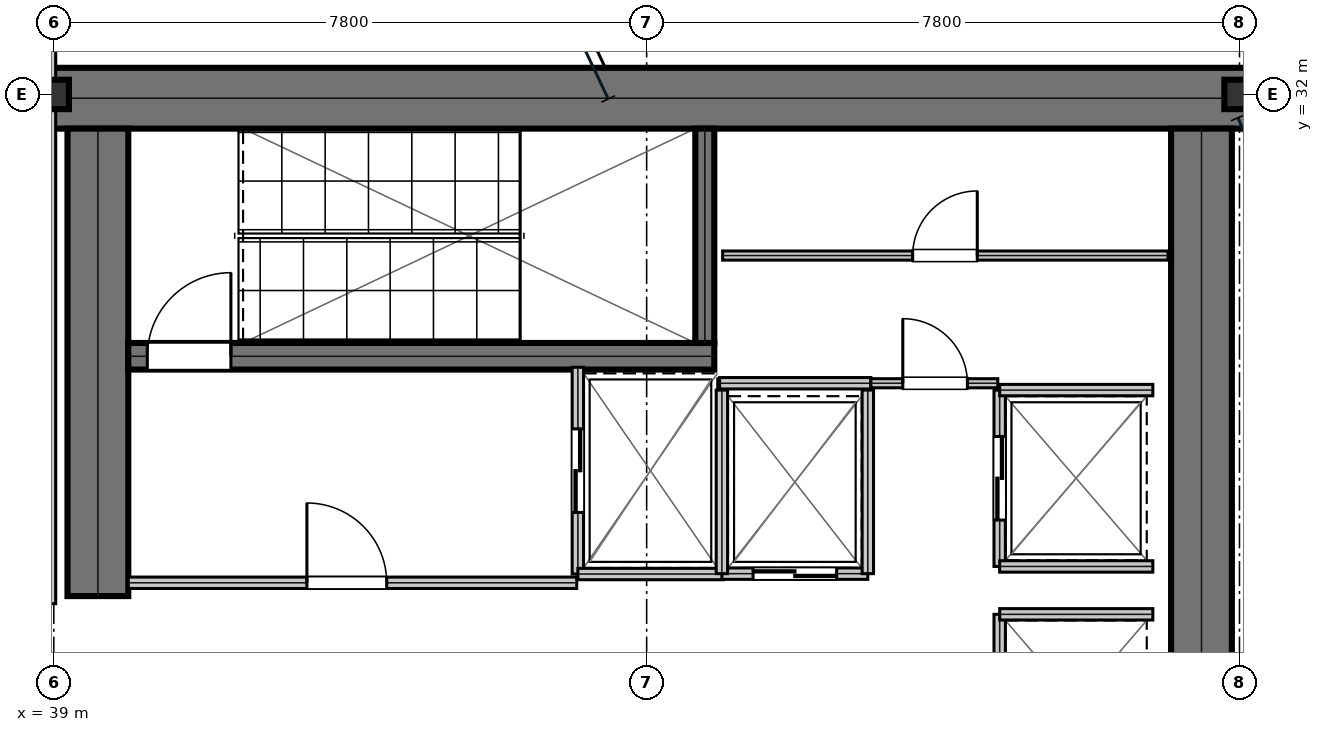
"""IFC4 building model, lengths in metres.
Left out: names, types, materials, properties, quantities, classifications, styles, units other than length and angle.
Written with IfcOpenShell. Run it as: python <this file> out.ifc"""

import sys

from ifc_helpers import new_model, si_unit, direction, frame, frame_2d, origin, origin_2d, place, context, subcontext, project, spatial, rectangle, i_section, extrude, element, fill, save


model = new_model("IFC4")
c1 = context("Model", 3, precision=1e-05, world=origin(), true_north=direction((0.0, 1.0)))
c2 = subcontext(c1, "Body", "Model", "MODEL_VIEW")
j1 = project(units=[si_unit("LENGTHUNIT", "METRE"), si_unit("PLANEANGLEUNIT", "RADIAN")], contexts=[c1])
p1 = place(None, origin())
s1 = spatial("IfcSite", under=j1, at=p1, CompositionType="ELEMENT")
p2 = place(p1, origin())
s2 = spatial("IfcBuilding", under=s1, at=p2, CompositionType="ELEMENT")
p3 = place(p2, frame((0.0, 0.0, 112.05)))
s3 = spatial("IfcBuildingStorey", under=s2, at=p3, CompositionType="ELEMENT", Elevation=112.05)
p4 = place(p3, frame((38.8, 31.95, 0.0), z_axis=(0.0, 0.0, 1.0), x_axis=(1.0, 0.0, 0.0)))
e1 = element("IfcWall", 1, at=p4, inside=s3, PredefinedType="SHEAR", context=c2, shape_type="SweptSolid", body=[
    extrude(rectangle(XDim=16.0, YDim=0.8, at=frame_2d((8.0, 0.0))), origin(), (0.0, 0.0, 1.0), 4.56),
])
p5 = place(p3, frame((39.58, 25.4, 0.0), z_axis=(0.0, 0.0, 1.0), x_axis=(0.0, 1.0, 0.0)))
e2 = element("IfcWall", 2, at=p5, inside=s3, PredefinedType="SHEAR", context=c2, shape_type="SweptSolid", body=[
    extrude(rectangle(XDim=6.15, YDim=0.8, at=frame_2d((3.075, 0.0))), origin(), (0.0, 0.0, 1.0), 4.56),
])
p6 = place(p3, frame((54.1, 16.45, 0.0), z_axis=(0.0, 0.0, 1.0), x_axis=(0.0, 1.0, 0.0)))
e3 = element("IfcWall", 3, at=p6, inside=s3, PredefinedType="SHEAR", context=c2, shape_type="SweptSolid", body=[
    extrude(rectangle(XDim=15.1, YDim=0.8, at=frame_2d((7.55, 0.0))), origin(), (0.0, 0.0, 1.0), 4.56),
])
p7 = place(p3, frame((39.98, 28.555, 0.0), z_axis=(0.0, 0.0, 1.0), x_axis=(1.0, 0.0, 0.0)))
e4 = element("IfcWall", 4, at=p7, inside=s3, PredefinedType="SHEAR", context=c2, shape_type="SweptSolid", body=[
    extrude(rectangle(XDim=7.71, YDim=0.35, at=frame_2d((3.855, 0.0))), origin(), (0.0, 0.0, 1.0), 4.56),
])
p8 = place(p7, frame((0.25, 0.0, 0.0)))
e5 = element("IfcOpeningElement", 5, at=p8, cuts=e4, PredefinedType="OPENING", context=c2, shape_type="SweptSolid", body=[
    extrude(rectangle(XDim=1.1, YDim=2.15, at=frame_2d((0.55, 1.075))), frame((0.0, 0.185, 0.0), z_axis=(0.0, -1.0, 0.0), x_axis=(1.0, 0.0, 0.0)), (0.0, 0.0, 1.0), 0.37),
])
p9 = place(p3, frame((47.565, 28.73, 0.0), z_axis=(0.0, 0.0, 1.0), x_axis=(0.0, 1.0, 0.0)))
e6 = element("IfcWall", 6, at=p9, inside=s3, PredefinedType="SHEAR", context=c2, shape_type="SweptSolid", body=[
    extrude(rectangle(XDim=2.82, YDim=0.25, at=frame_2d((1.41, 0.0))), origin(), (0.0, 0.0, 1.0), 4.56),
])
for number, where, z_axis, x_axis in (
    (7, (39.0, 32.0, 0.0), (0.0, 0.0, 1.0), (1.0, 0.0, 0.0)),
    (8, (54.6, 32.0, 0.0), (0.0, 0.0, 1.0), (1.0, 0.0, 0.0)),
):
    element("IfcColumn", number, at=place(p3, frame(where, z_axis=z_axis, x_axis=x_axis)), inside=s3, PredefinedType="COLUMN", context=c2, shape_type="SweptSolid", body=[
        extrude(i_section(OverallWidth=0.398, OverallDepth=0.387, WebThickness=0.021, FlangeThickness=0.033, at=origin_2d()), origin(), (0.0, 0.0, 1.0), 4.794),
    ])
p10 = place(p3, frame((39.98, 25.575, 0.0), z_axis=(0.0, 0.0, 1.0), x_axis=(1.0, 0.0, 0.0)))
e9 = element("IfcWall", 9, at=p10, inside=s3, PredefinedType="PARTITIONING", context=c2, shape_type="SweptSolid", body=[
    extrude(rectangle(XDim=5.9, YDim=0.15, at=frame_2d((2.95, 0.0))), origin(), (0.0, 0.0, 1.0), 4.56),
])
p11 = place(p10, frame((2.35, 0.0, 0.0)))
e10 = element("IfcOpeningElement", 10, at=p11, cuts=e9, PredefinedType="OPENING", context=c2, shape_type="SweptSolid", body=[
    extrude(rectangle(XDim=1.05, YDim=2.15, at=frame_2d((0.525, 1.075))), frame((0.0, 0.085, 0.0), z_axis=(0.0, -1.0, 0.0), x_axis=(1.0, 0.0, 0.0)), (0.0, 0.0, 1.0), 0.17),
])
p12 = place(p3, frame((45.895, 25.69, 0.0), z_axis=(0.0, 0.0, 1.0), x_axis=(0.0, 1.0, 0.0)))
e11 = element("IfcWall", 11, at=p12, inside=s3, PredefinedType="PARTITIONING", context=c2, shape_type="SweptSolid", body=[
    extrude(rectangle(XDim=2.72, YDim=0.15, at=frame_2d((1.36, 0.0))), origin(), (0.0, 0.0, 1.0), 4.56),
])
p13 = place(p12, frame((0.81, 0.0, 0.0)))
e12 = element("IfcOpeningElement", 12, at=p13, cuts=e11, PredefinedType="OPENING", context=c2, shape_type="SweptSolid", body=[
    extrude(rectangle(XDim=1.1, YDim=2.15, at=frame_2d((0.55, 1.075))), frame((0.0, 0.085, 0.0), z_axis=(0.0, -1.0, 0.0), x_axis=(1.0, 0.0, 0.0)), (0.0, 0.0, 1.0), 0.17),
])
p14 = place(p3, frame((45.895, 25.69, 0.0), z_axis=(0.0, 0.0, 1.0), x_axis=(1.0, 0.0, 0.0)))
e13 = element("IfcWall", 13, at=p14, inside=s3, PredefinedType="PARTITIONING", context=c2, shape_type="SweptSolid", body=[
    extrude(rectangle(XDim=1.915, YDim=0.15, at=frame_2d((0.958, 0.0))), origin(), (0.0, 0.0, 1.0), 4.56),
])
p15 = place(p3, frame((47.79, 25.695, 0.0), z_axis=(0.0, 0.0, 1.0), x_axis=(1.0, 0.0, 0.0)))
e14 = element("IfcWall", 14, at=p15, inside=s3, PredefinedType="PARTITIONING", context=c2, shape_type="SweptSolid", body=[
    extrude(rectangle(XDim=1.92, YDim=0.15, at=frame_2d((0.96, 0.0))), origin(), (0.0, 0.0, 1.0), 4.56),
])
p16 = place(p15, frame((0.41, 0.0, 0.0)))
e15 = element("IfcOpeningElement", 15, at=p16, cuts=e14, PredefinedType="OPENING", context=c2, shape_type="SweptSolid", body=[
    extrude(rectangle(XDim=1.1, YDim=2.15, at=frame_2d((0.55, 1.075))), frame((0.0, 0.085, 0.0), z_axis=(0.0, -1.0, 0.0), x_axis=(1.0, 0.0, 0.0)), (0.0, 0.0, 1.0), 0.17),
])
for number, where, z_axis, x_axis in (
    (16, (47.79, 25.695, 0.0), (0.0, 0.0, 1.0), (0.0, 1.0, 0.0)),
    (17, (49.71, 25.695, 0.0), (0.0, 0.0, 1.0), (0.0, 1.0, 0.0)),
):
    element("IfcWall", number, at=place(p3, frame(where, z_axis=z_axis, x_axis=x_axis)), inside=s3, PredefinedType="PARTITIONING", context=c2, shape_type="SweptSolid", body=[
        extrude(rectangle(XDim=2.415, YDim=0.15, at=frame_2d((1.208, 0.0))), origin(), (0.0, 0.0, 1.0), 4.56),
    ])
p17 = place(p3, frame((51.445, 25.79, 0.0), z_axis=(0.0, 0.0, 1.0), x_axis=(0.0, 1.0, 0.0)))
e18 = element("IfcWall", 18, at=p17, inside=s3, PredefinedType="PARTITIONING", context=c2, shape_type="SweptSolid", body=[
    extrude(rectangle(XDim=2.32, YDim=0.15, at=frame_2d((1.16, 0.0))), origin(), (0.0, 0.0, 1.0), 4.56),
])
p18 = place(p17, frame((0.61, 0.0, 0.0)))
e19 = element("IfcOpeningElement", 19, at=p18, cuts=e18, PredefinedType="OPENING", context=c2, shape_type="SweptSolid", body=[
    extrude(rectangle(XDim=1.1, YDim=2.15, at=frame_2d((0.55, 1.075))), frame((0.0, 0.085, 0.0), z_axis=(0.0, -1.0, 0.0), x_axis=(1.0, 0.0, 0.0)), (0.0, 0.0, 1.0), 0.17),
])
for number, where, z_axis, x_axis in (
    (20, (51.445, 25.79, 0.0), (0.0, 0.0, 1.0), (1.0, 0.0, 0.0)),
    (21, (51.445, 28.11, 0.0), (0.0, 0.0, 1.0), (1.0, 0.0, 0.0)),
):
    element("IfcWall", number, at=place(p3, frame(where, z_axis=z_axis, x_axis=x_axis)), inside=s3, PredefinedType="PARTITIONING", context=c2, shape_type="SweptSolid", body=[
        extrude(rectangle(XDim=2.015, YDim=0.15, at=frame_2d((1.007, 0.0))), origin(), (0.0, 0.0, 1.0), 4.56),
    ])
p19 = place(p3, frame((51.445, 22.84, 0.0), z_axis=(0.0, 0.0, 1.0), x_axis=(0.0, 1.0, 0.0)))
e22 = element("IfcWall", 22, at=p19, inside=s3, PredefinedType="PARTITIONING", context=c2, shape_type="SweptSolid", body=[
    extrude(rectangle(XDim=2.32, YDim=0.15, at=frame_2d((1.16, 0.0))), origin(), (0.0, 0.0, 1.0), 4.56),
])
p20 = place(p3, frame((51.445, 25.16, 0.0), z_axis=(0.0, 0.0, 1.0), x_axis=(1.0, 0.0, 0.0)))
e23 = element("IfcWall", 23, at=p20, inside=s3, PredefinedType="PARTITIONING", context=c2, shape_type="SweptSolid", body=[
    extrude(rectangle(XDim=2.015, YDim=0.15, at=frame_2d((1.007, 0.0))), origin(), (0.0, 0.0, 1.0), 4.56),
])
p21 = place(p3, frame((47.76, 28.2, 0.0), z_axis=(0.0, 0.0, 1.0), x_axis=(1.0, 0.0, 0.0)))
e24 = element("IfcWall", 24, at=p21, inside=s3, PredefinedType="PARTITIONING", context=c2, shape_type="SweptSolid", body=[
    extrude(rectangle(XDim=1.99, YDim=0.15, at=frame_2d((0.995, 0.0))), origin(), (0.0, 0.0, 1.0), 4.56),
])
p22 = place(p3, frame((49.75, 28.2, 0.0), z_axis=(0.0, 0.0, 1.0), x_axis=(1.0, 0.0, 0.0)))
e25 = element("IfcWall", 25, at=p22, inside=s3, PredefinedType="PARTITIONING", context=c2, shape_type="SweptSolid", body=[
    extrude(rectangle(XDim=1.67, YDim=0.12, at=frame_2d((0.835, 0.0))), origin(), (0.0, 0.0, 1.0), 4.56),
])
p23 = place(p22, frame((0.42, 0.0, 0.0)))
e26 = element("IfcOpeningElement", 26, at=p23, cuts=e25, PredefinedType="OPENING", context=c2, shape_type="SweptSolid", body=[
    extrude(rectangle(XDim=0.85, YDim=2.15, at=frame_2d((0.425, 1.075))), frame((0.0, 0.07, 0.0), z_axis=(0.0, -1.0, 0.0), x_axis=(1.0, 0.0, 0.0)), (0.0, 0.0, 1.0), 0.14),
])
p24 = place(p3, frame((47.8, 29.88, 0.0), z_axis=(0.0, 0.0, 1.0), x_axis=(1.0, 0.0, 0.0)))
e27 = element("IfcWall", 27, at=p24, inside=s3, PredefinedType="PARTITIONING", context=c2, shape_type="SweptSolid", body=[
    extrude(rectangle(XDim=5.86, YDim=0.12, at=frame_2d((2.93, 0.0))), origin(), (0.0, 0.0, 1.0), 4.56),
])
p25 = place(p24, frame((2.5, 0.0, 0.0)))
e28 = element("IfcOpeningElement", 28, at=p25, cuts=e27, PredefinedType="OPENING", context=c2, shape_type="SweptSolid", body=[
    extrude(rectangle(XDim=0.85, YDim=2.15, at=frame_2d((0.425, 1.075))), frame((0.0, 0.07, 0.0), z_axis=(0.0, -1.0, 0.0), x_axis=(1.0, 0.0, 0.0)), (0.0, 0.0, 1.0), 0.14),
])
p26 = place(p3, frame((38.95, 25.3, 0.0), z_axis=(0.0, 0.0, 1.0), x_axis=(0.0, 1.0, 0.0)))
e29 = element("IfcWall", 29, at=p26, inside=s3, PredefinedType="PARTITIONING", context=c2, shape_type="SweptSolid", body=[
    extrude(rectangle(XDim=8.2, YDim=0.15, at=frame_2d((4.1, 0.0))), origin(), (0.0, 0.0, 1.0), 3.94),
])
p27 = place(p11, origin())
e30 = element("IfcDoor", 30, at=p27, inside=s3, OperationType="SINGLE_SWING_LEFT", PredefinedType="DOOR", context=c2, shape_type="SweptSolid", body=[
    extrude(rectangle(XDim=1.05, YDim=2.15, at=frame_2d((0.525, 1.075))), frame((0.0, 0.025, 0.0), z_axis=(0.0, -1.0, 0.0), x_axis=(1.0, 0.0, 0.0)), (0.0, 0.0, 1.0), 0.05),
])
fill(e10, e30)
p28 = place(p13, frame((1.1, 0.0, 0.0), z_axis=(0.0, 0.0, 1.0), x_axis=(-1.0, 0.0, 0.0)))
e31 = element("IfcDoor", 31, at=p28, inside=s3, OperationType="DOUBLE_DOOR_SLIDING", PredefinedType="DOOR", context=c2, shape_type="SweptSolid", body=[
    extrude(rectangle(XDim=1.1, YDim=2.15, at=frame_2d((0.55, 1.075))), frame((0.0, 0.025, 0.0), z_axis=(0.0, -1.0, 0.0), x_axis=(1.0, 0.0, 0.0)), (0.0, 0.0, 1.0), 0.05),
])
fill(e12, e31)
p29 = place(p16, frame((1.1, 0.0, 0.0), z_axis=(0.0, 0.0, 1.0), x_axis=(-1.0, 0.0, 0.0)))
e32 = element("IfcDoor", 32, at=p29, inside=s3, OperationType="DOUBLE_DOOR_SLIDING", PredefinedType="DOOR", context=c2, shape_type="SweptSolid", body=[
    extrude(rectangle(XDim=1.1, YDim=2.15, at=frame_2d((0.55, 1.075))), frame((0.0, 0.025, 0.0), z_axis=(0.0, -1.0, 0.0), x_axis=(1.0, 0.0, 0.0)), (0.0, 0.0, 1.0), 0.05),
])
fill(e15, e32)
p30 = place(p18, frame((1.1, 0.0, 0.0), z_axis=(0.0, 0.0, 1.0), x_axis=(-1.0, 0.0, 0.0)))
e33 = element("IfcDoor", 33, at=p30, inside=s3, OperationType="DOUBLE_DOOR_SLIDING", PredefinedType="DOOR", context=c2, shape_type="SweptSolid", body=[
    extrude(rectangle(XDim=1.1, YDim=2.15, at=frame_2d((0.55, 1.075))), frame((0.0, 0.025, 0.0), z_axis=(0.0, -1.0, 0.0), x_axis=(1.0, 0.0, 0.0)), (0.0, 0.0, 1.0), 0.05),
])
fill(e19, e33)
p31 = place(p23, origin())
e34 = element("IfcDoor", 34, at=p31, inside=s3, OperationType="SINGLE_SWING_LEFT", PredefinedType="DOOR", context=c2, shape_type="SweptSolid", body=[
    extrude(rectangle(XDim=0.85, YDim=2.15, at=frame_2d((0.425, 1.075))), frame((0.0, 0.025, 0.0), z_axis=(0.0, -1.0, 0.0), x_axis=(1.0, 0.0, 0.0)), (0.0, 0.0, 1.0), 0.05),
])
fill(e26, e34)
p32 = place(p25, origin())
e35 = element("IfcDoor", 35, at=p32, inside=s3, OperationType="SINGLE_SWING_RIGHT", PredefinedType="DOOR", context=c2, shape_type="SweptSolid", body=[
    extrude(rectangle(XDim=0.85, YDim=2.15, at=frame_2d((0.425, 1.075))), frame((0.0, 0.025, 0.0), z_axis=(0.0, -1.0, 0.0), x_axis=(1.0, 0.0, 0.0)), (0.0, 0.0, 1.0), 0.05),
])
fill(e28, e35)
p33 = place(p8, origin())
e36 = element("IfcDoor", 36, at=p33, inside=s3, OperationType="SINGLE_SWING_RIGHT", PredefinedType="DOOR", context=c2, shape_type="SweptSolid", body=[
    extrude(rectangle(XDim=1.1, YDim=2.15, at=frame_2d((0.55, 1.075))), frame((0.0, 0.025, 0.0), z_axis=(0.0, -1.0, 0.0), x_axis=(1.0, 0.0, 0.0)), (0.0, 0.0, 1.0), 0.05),
])
fill(e5, e36)
save(model, sys.argv[1])
